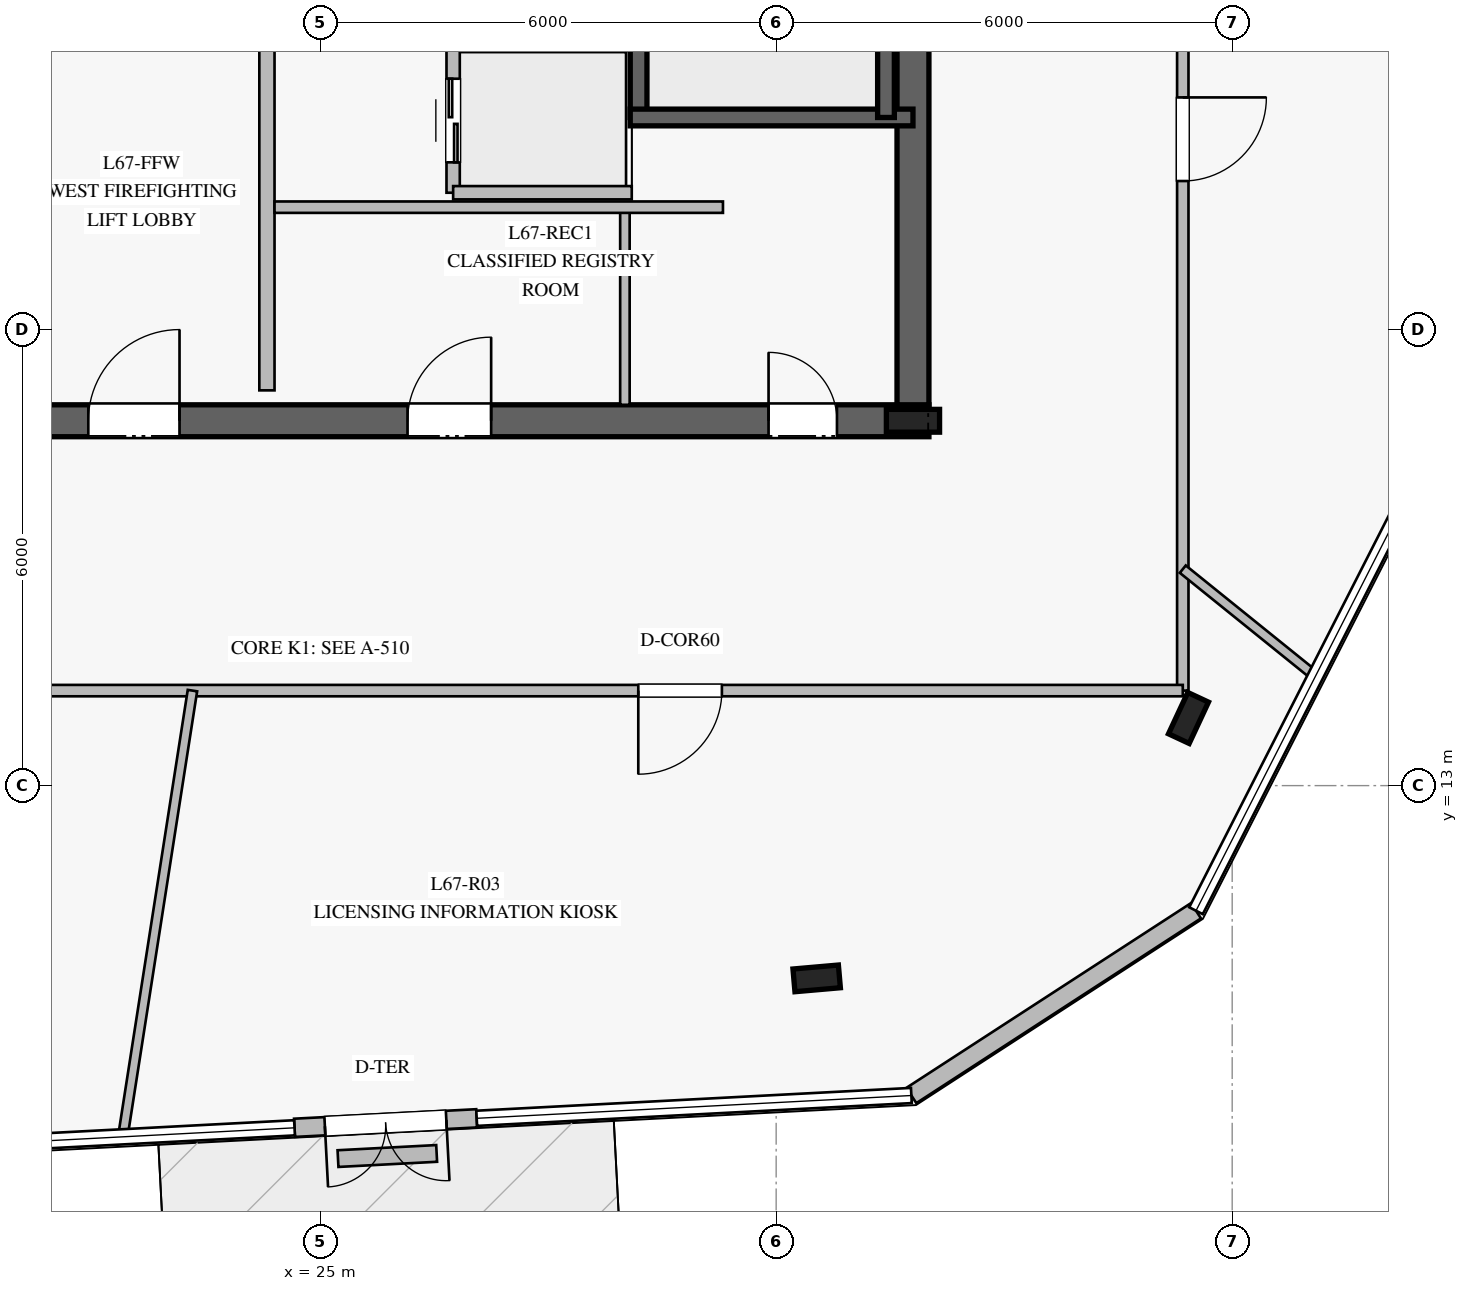
"""IFC4 building model, lengths in metres.
Left out: names, types, materials, properties, quantities, classifications, styles, units other than length and angle.
Written with IfcOpenShell. Run it as: python <this file> out.ifc"""

import sys

from ifc_helpers import new_model, si_unit, direction, frame, frame_2d, origin, origin_2d, place, context, subcontext, project, spatial, rectangle, i_section, extrude, element, fill, save


model = new_model("IFC4")
c1 = context("Model", 3, precision=1e-05, world=origin(), true_north=direction((0.0, 1.0)))
c2 = subcontext(c1, "Body", "Model", "MODEL_VIEW")
j1 = project(units=[si_unit("LENGTHUNIT", "METRE"), si_unit("PLANEANGLEUNIT", "RADIAN")], contexts=[c1])
p1 = place(None, origin())
s1 = spatial("IfcSite", under=j1, at=p1, CompositionType="ELEMENT")
p2 = place(p1, origin())
s2 = spatial("IfcBuilding", under=s1, at=p2, CompositionType="ELEMENT")
p3 = place(p2, frame((0.0, 0.0, 278.2)))
s3 = spatial("IfcBuildingStorey", under=s2, at=p3, CompositionType="ELEMENT", Elevation=278.2)
p4 = place(p3, frame((16.99, 17.8, 0.0), z_axis=(0.0, 0.0, 1.0), x_axis=(1.0, 0.0, 0.0)))
e1 = element("IfcWall", 1, at=p4, inside=s3, PredefinedType="SHEAR", context=c2, shape_type="SweptSolid", body=[
    extrude(rectangle(XDim=16.02, YDim=0.42, at=frame_2d((8.01, 0.0))), origin(), (0.0, 0.0, 1.0), 3.78),
])
p5 = place(p4, frame((4.96, 0.0, 0.0)))
e2 = element("IfcOpeningElement", 2, at=p5, cuts=e1, PredefinedType="OPENING", context=c2, shape_type="SweptSolid", body=[
    extrude(rectangle(XDim=1.2, YDim=2.25, at=frame_2d((0.6, 1.125))), frame((0.0, 0.22, 0.0), z_axis=(0.0, -1.0, 0.0), x_axis=(1.0, 0.0, 0.0)), (0.0, 0.0, 1.0), 0.44),
])
p6 = place(p4, frame((13.91, 0.0, 0.0)))
e3 = element("IfcOpeningElement", 3, at=p6, cuts=e1, PredefinedType="OPENING", context=c2, shape_type="SweptSolid", body=[
    extrude(rectangle(XDim=0.9, YDim=2.1, at=frame_2d((0.45, 1.05))), frame((0.0, 0.22, 0.0), z_axis=(0.0, -1.0, 0.0), x_axis=(1.0, 0.0, 0.0)), (0.0, 0.0, 1.0), 0.44),
])
p7 = place(p4, frame((9.16, 0.0, 0.0)))
e4 = element("IfcOpeningElement", 4, at=p7, cuts=e1, PredefinedType="OPENING", context=c2, shape_type="SweptSolid", body=[
    extrude(rectangle(XDim=1.1, YDim=2.2, at=frame_2d((0.55, 1.1))), frame((0.0, 0.22, 0.0), z_axis=(0.0, -1.0, 0.0), x_axis=(1.0, 0.0, 0.0)), (0.0, 0.0, 1.0), 0.44),
])
p8 = place(p3, frame((32.8, 18.01, 0.0), z_axis=(0.0, 0.0, 1.0), x_axis=(0.0, 1.0, 0.0)))
e5 = element("IfcWall", 5, at=p8, inside=s3, PredefinedType="SHEAR", context=c2, shape_type="SweptSolid", body=[
    extrude(rectangle(XDim=13.98, YDim=0.42, at=frame_2d((6.99, 0.0))), origin(), (0.0, 0.0, 1.0), 3.78),
])
p9 = place(p3, frame((32.8, 17.8, 0.0), z_axis=(0.0, 0.0, 1.0), x_axis=(1.0, 0.0, 0.0)))
e6 = element("IfcColumn", 6, at=p9, inside=s3, PredefinedType="COLUMN", context=c2, shape_type="SweptSolid", body=[
    extrude(i_section(OverallWidth=0.3, OverallDepth=0.7, WebThickness=0.017, FlangeThickness=0.032, at=origin_2d()), origin(), (0.0, 0.0, 1.0), 4.0),
])
p10 = place(p3, frame((29.19, 21.79, 0.0), z_axis=(0.0, 0.0, 1.0), x_axis=(0.0, 1.0, 0.0)))
e7 = element("IfcWall", 7, at=p10, inside=s3, PredefinedType="SOLIDWALL", context=c2, shape_type="SweptSolid", body=[
    extrude(rectangle(XDim=7.22, YDim=0.22, at=frame_2d((3.61, 0.0))), origin(), (0.0, 0.0, 1.0), 3.78),
])
p11 = place(p10, frame((5.88, 0.0, 0.0)))
e8 = element("IfcOpeningElement", 8, at=p11, cuts=e7, PredefinedType="OPENING", context=c2, shape_type="SweptSolid", body=[
    extrude(rectangle(XDim=1.15, YDim=2.2, at=frame_2d((0.575, 1.1))), frame((0.0, 0.12, 0.0), z_axis=(0.0, -1.0, 0.0), x_axis=(1.0, 0.0, 0.0)), (0.0, 0.0, 1.0), 0.24),
])
p12 = place(p3, frame((29.08, 21.79, 0.0), z_axis=(0.0, 0.0, 1.0), x_axis=(1.0, 0.0, 0.0)))
e9 = element("IfcWall", 9, at=p12, inside=s3, PredefinedType="SOLIDWALL", context=c2, shape_type="SweptSolid", body=[
    extrude(rectangle(XDim=3.72, YDim=0.22, at=frame_2d((1.86, 0.0))), origin(), (0.0, 0.0, 1.0), 3.78),
])
p13 = place(p3, frame((32.445, 29.01, 0.0), z_axis=(0.0, 0.0, 1.0), x_axis=(0.0, -1.0, 0.0)))
e10 = element("IfcWall", 10, at=p13, inside=s3, PredefinedType="SOLIDWALL", context=c2, shape_type="SweptSolid", body=[
    extrude(rectangle(XDim=7.22, YDim=0.22, at=frame_2d((3.61, 0.0))), origin(), (0.0, 0.0, 1.0), 3.78),
])
for number, where, z_axis, x_axis in (
    (11, (31.533, 10.464, 0.0), (0.0, 0.0, 1.0), (0.996, 0.087, 0.0)),
    (12, (36.425, 13.89, 0.0), (0.0, 0.0, 1.0), (0.423, 0.906, 0.0)),
):
    element("IfcColumn", number, at=place(p3, frame(where, z_axis=z_axis, x_axis=x_axis)), inside=s3, PredefinedType="COLUMN", context=c2, shape_type="SweptSolid", body=[
        extrude(i_section(OverallWidth=0.3, OverallDepth=0.6, WebThickness=0.015, FlangeThickness=0.03, at=origin_2d()), origin(), (0.0, 0.0, 1.0), 4.0),
    ])
p14 = place(p3, frame((24.663, 8.498, 0.0), z_axis=(0.0, 0.0, 1.0), x_axis=(0.998643002132, 0.052078347636, 0.0)))
e13 = element("IfcWall", 13, at=p14, inside=s3, PredefinedType="STANDARD", context=c2, shape_type="SweptSolid", body=[
    extrude(rectangle(XDim=2.4, YDim=0.24, at=frame_2d((1.2, 0.0))), origin(), (0.0, 0.0, 1.0), 3.78),
])
p15 = place(p14, frame((0.4, 0.0, 0.0)))
e14 = element("IfcOpeningElement", 14, at=p15, cuts=e13, PredefinedType="OPENING", context=c2, shape_type="SweptSolid", body=[
    extrude(rectangle(XDim=1.6, YDim=2.25, at=frame_2d((0.8, 1.125))), frame((0.0, 0.13, 0.0), z_axis=(0.0, -1.0, 0.0), x_axis=(1.0, 0.0, 0.0)), (0.0, 0.0, 1.0), 0.26),
])
p16 = place(p3, frame((32.779, 8.923, 0.0), z_axis=(0.0, 0.0, 1.0), x_axis=(0.838777032967, 0.544475058169, 0.0)))
e15 = element("IfcWall", 15, at=p16, inside=s3, PredefinedType="STANDARD", context=c2, shape_type="SweptSolid", body=[
    extrude(rectangle(XDim=4.465, YDim=0.24, at=frame_2d((2.232, 0.0))), origin(), (0.0, 0.0, 1.0), 3.78),
])
p17 = place(p3, frame((25.235, 8.093, 0.0), z_axis=(0.0, 0.0, 1.0), x_axis=(0.998635416873, 0.052223597797, 0.0)))
e16 = element("IfcWall", 16, at=p17, inside=s3, PredefinedType="USERDEFINED", context=c2, shape_type="SweptSolid", body=[
    extrude(rectangle(XDim=1.3, YDim=0.22, at=frame_2d((0.65, 0.0))), origin(), (0.0, 0.0, 1.0), 0.4),
])
p18 = place(p3, frame((24.3, 18.2, 0.0), z_axis=(0.0, 0.0, 1.0), x_axis=(0.0, 1.0, 0.0)))
e17 = element("IfcWall", 17, at=p18, inside=s3, PredefinedType="PARTITIONING", context=c2, shape_type="SweptSolid", body=[
    extrude(rectangle(XDim=5.15, YDim=0.2, at=frame_2d((2.575, 0.0))), origin(), (0.0, 0.0, 1.0), 3.78),
])
p19 = place(p3, frame((29.01, 18.01, 0.0), z_axis=(0.0, 0.0, 1.0), x_axis=(0.0, 1.0, 0.0)))
e18 = element("IfcWall", 18, at=p19, inside=s3, PredefinedType="PARTITIONING", context=c2, shape_type="SweptSolid", body=[
    extrude(rectangle(XDim=2.54, YDim=0.125, at=frame_2d((1.27, 0.0))), origin(), (0.0, 0.0, 1.0), 3.78),
])
p20 = place(p3, frame((24.4, 20.61, 0.0), z_axis=(0.0, 0.0, 1.0), x_axis=(1.0, 0.0, 0.0)))
e19 = element("IfcWall", 19, at=p20, inside=s3, PredefinedType="PARTITIONING", context=c2, shape_type="SweptSolid", body=[
    extrude(rectangle(XDim=5.9, YDim=0.15, at=frame_2d((2.95, 0.0))), origin(), (0.0, 0.0, 1.0), 3.78),
])
p21 = place(p3, frame((26.75, 20.8, 0.0), z_axis=(0.0, 0.0, 1.0), x_axis=(0.0, 1.0, 0.0)))
e20 = element("IfcWall", 20, at=p21, inside=s3, PredefinedType="PARTITIONING", context=c2, shape_type="SweptSolid", body=[
    extrude(rectangle(XDim=1.9, YDim=0.175, at=frame_2d((0.95, 0.0))), origin(), (0.0, 0.0, 1.0), 3.78),
])
p22 = place(p21, frame((0.4, 0.0, 0.0)))
e21 = element("IfcOpeningElement", 21, at=p22, cuts=e20, PredefinedType="OPENING", context=c2, shape_type="SweptSolid", body=[
    extrude(rectangle(XDim=1.1, YDim=2.2, at=frame_2d((0.55, 1.1))), frame((0.0, 0.098, 0.0), z_axis=(0.0, -1.0, 0.0), x_axis=(1.0, 0.0, 0.0)), (0.0, 0.0, 1.0), 0.195),
])
p23 = place(p3, frame((26.75, 20.8, 0.0), z_axis=(0.0, 0.0, 1.0), x_axis=(1.0, 0.0, 0.0)))
e22 = element("IfcWall", 22, at=p23, inside=s3, PredefinedType="PARTITIONING", context=c2, shape_type="SweptSolid", body=[
    extrude(rectangle(XDim=2.35, YDim=0.175, at=frame_2d((1.175, 0.0))), origin(), (0.0, 0.0, 1.0), 3.78),
])
p24 = place(p3, frame((36.35, 35.75, 0.0), z_axis=(0.0, 0.0, 1.0), x_axis=(0.0, -1.0, 0.0)))
e23 = element("IfcWall", 23, at=p24, inside=s3, PredefinedType="PARTITIONING", context=c2, shape_type="SweptSolid", body=[
    extrude(rectangle(XDim=21.5, YDim=0.15, at=frame_2d((10.75, 0.0))), origin(), (0.0, 0.0, 1.0), 3.28),
])
p25 = place(p24, frame((13.696, 0.0, 0.0)))
e24 = element("IfcOpeningElement", 24, at=p25, cuts=e23, PredefinedType="OPENING", context=c2, shape_type="SweptSolid", body=[
    extrude(rectangle(XDim=1.1, YDim=2.2, at=frame_2d((0.55, 1.1))), frame((0.0, 0.085, 0.0), z_axis=(0.0, -1.0, 0.0), x_axis=(1.0, 0.0, 0.0)), (0.0, 0.0, 1.0), 0.17),
])
p26 = place(p3, frame((36.35, 14.25, 0.0), z_axis=(0.0, 0.0, 1.0), x_axis=(-1.0, 0.0, 0.0)))
e25 = element("IfcWall", 25, at=p26, inside=s3, PredefinedType="PARTITIONING", context=c2, shape_type="SweptSolid", body=[
    extrude(rectangle(XDim=22.7, YDim=0.15, at=frame_2d((11.35, 0.0))), origin(), (0.0, 0.0, 1.0), 3.05),
])
p27 = place(p26, frame((17.137, 0.0, 0.0)))
e26 = element("IfcOpeningElement", 26, at=p27, cuts=e25, PredefinedType="OPENING", context=c2, shape_type="SweptSolid", body=[
    extrude(rectangle(XDim=1.1, YDim=2.2, at=frame_2d((0.55, 1.1))), frame((0.0, 0.085, 0.0), z_axis=(0.0, -1.0, 0.0), x_axis=(1.0, 0.0, 0.0)), (0.0, 0.0, 1.0), 0.17),
])
p28 = place(p26, frame((6.064, 0.0, 0.0)))
e27 = element("IfcOpeningElement", 27, at=p28, cuts=e25, PredefinedType="OPENING", context=c2, shape_type="SweptSolid", body=[
    extrude(rectangle(XDim=1.1, YDim=2.2, at=frame_2d((0.55, 1.1))), frame((0.0, 0.085, 0.0), z_axis=(0.0, -1.0, 0.0), x_axis=(1.0, 0.0, 0.0)), (0.0, 0.0, 1.0), 0.17),
])
p29 = place(p3, frame((23.32, 14.25, 0.0), z_axis=(0.0, 0.0, 1.0), x_axis=(-0.154248687159, -0.988032055406, 0.0)))
e28 = element("IfcWall", 28, at=p29, inside=s3, PredefinedType="PARTITIONING", context=c2, shape_type="SweptSolid", body=[
    extrude(rectangle(XDim=5.926, YDim=0.125, at=frame_2d((2.963, 0.0))), origin(), (0.0, 0.0, 1.0), 3.05),
])
p30 = place(p3, frame((36.35, 15.848, 0.0), z_axis=(0.0, 0.0, 1.0), x_axis=(0.778316237, -0.627872467323, 0.0)))
e29 = element("IfcWall", 29, at=p30, inside=s3, PredefinedType="PARTITIONING", context=c2, shape_type="SweptSolid", body=[
    extrude(rectangle(XDim=2.227, YDim=0.125, at=frame_2d((1.113, 0.0))), origin(), (0.0, 0.0, 1.0), 3.28),
])
p31 = place(p15, frame((1.6, 0.0, 0.0), z_axis=(0.0, 0.0, 1.0), x_axis=(-1.0, 0.0, 0.0)))
e30 = element("IfcDoor", 30, at=p31, inside=s3, OperationType="DOUBLE_DOOR_SINGLE_SWING", PredefinedType="DOOR", context=c2, shape_type="SweptSolid", body=[
    extrude(rectangle(XDim=1.6, YDim=2.25, at=frame_2d((0.8, 1.125))), frame((0.0, 0.025, 0.0), z_axis=(0.0, -1.0, 0.0), x_axis=(1.0, 0.0, 0.0)), (0.0, 0.0, 1.0), 0.05),
])
fill(e14, e30)
p32 = place(p5, origin())
e31 = element("IfcDoor", 31, at=p32, inside=s3, OperationType="SINGLE_SWING_RIGHT", PredefinedType="DOOR", context=c2, shape_type="SweptSolid", body=[
    extrude(rectangle(XDim=1.2, YDim=2.25, at=frame_2d((0.6, 1.125))), frame((0.0, 0.025, 0.0), z_axis=(0.0, -1.0, 0.0), x_axis=(1.0, 0.0, 0.0)), (0.0, 0.0, 1.0), 0.05),
])
fill(e2, e31)
p33 = place(p6, origin())
e32 = element("IfcDoor", 32, at=p33, inside=s3, OperationType="SINGLE_SWING_LEFT", PredefinedType="DOOR", context=c2, shape_type="SweptSolid", body=[
    extrude(rectangle(XDim=0.9, YDim=2.1, at=frame_2d((0.45, 1.05))), frame((0.0, 0.025, 0.0), z_axis=(0.0, -1.0, 0.0), x_axis=(1.0, 0.0, 0.0)), (0.0, 0.0, 1.0), 0.05),
])
fill(e3, e32)
p34 = place(p7, origin())
e33 = element("IfcDoor", 33, at=p34, inside=s3, OperationType="SINGLE_SWING_RIGHT", PredefinedType="DOOR", context=c2, shape_type="SweptSolid", body=[
    extrude(rectangle(XDim=1.1, YDim=2.2, at=frame_2d((0.55, 1.1))), frame((0.0, 0.025, 0.0), z_axis=(0.0, -1.0, 0.0), x_axis=(1.0, 0.0, 0.0)), (0.0, 0.0, 1.0), 0.05),
])
fill(e4, e33)
p35 = place(p22, origin())
e34 = element("IfcDoor", 34, at=p35, inside=s3, OperationType="DOUBLE_DOOR_SLIDING", PredefinedType="DOOR", context=c2, shape_type="SweptSolid", body=[
    extrude(rectangle(XDim=1.1, YDim=2.2, at=frame_2d((0.55, 1.1))), frame((0.0, 0.025, 0.0), z_axis=(0.0, -1.0, 0.0), x_axis=(1.0, 0.0, 0.0)), (0.0, 0.0, 1.0), 0.05),
])
fill(e21, e34)
p36 = place(p28, origin())
e35 = element("IfcDoor", 35, at=p36, inside=s3, OperationType="SINGLE_SWING_RIGHT", PredefinedType="DOOR", context=c2, shape_type="SweptSolid", body=[
    extrude(rectangle(XDim=1.1, YDim=2.2, at=frame_2d((0.55, 1.1))), frame((0.0, 0.025, 0.0), z_axis=(0.0, -1.0, 0.0), x_axis=(1.0, 0.0, 0.0)), (0.0, 0.0, 1.0), 0.05),
])
fill(e27, e35)
p37 = place(p25, origin())
e36 = element("IfcDoor", 36, at=p37, inside=s3, OperationType="SINGLE_SWING_LEFT", PredefinedType="DOOR", context=c2, shape_type="SweptSolid", body=[
    extrude(rectangle(XDim=1.1, YDim=2.2, at=frame_2d((0.55, 1.1))), frame((0.0, 0.025, 0.0), z_axis=(0.0, -1.0, 0.0), x_axis=(1.0, 0.0, 0.0)), (0.0, 0.0, 1.0), 0.05),
])
fill(e24, e36)
save(model, sys.argv[1])
